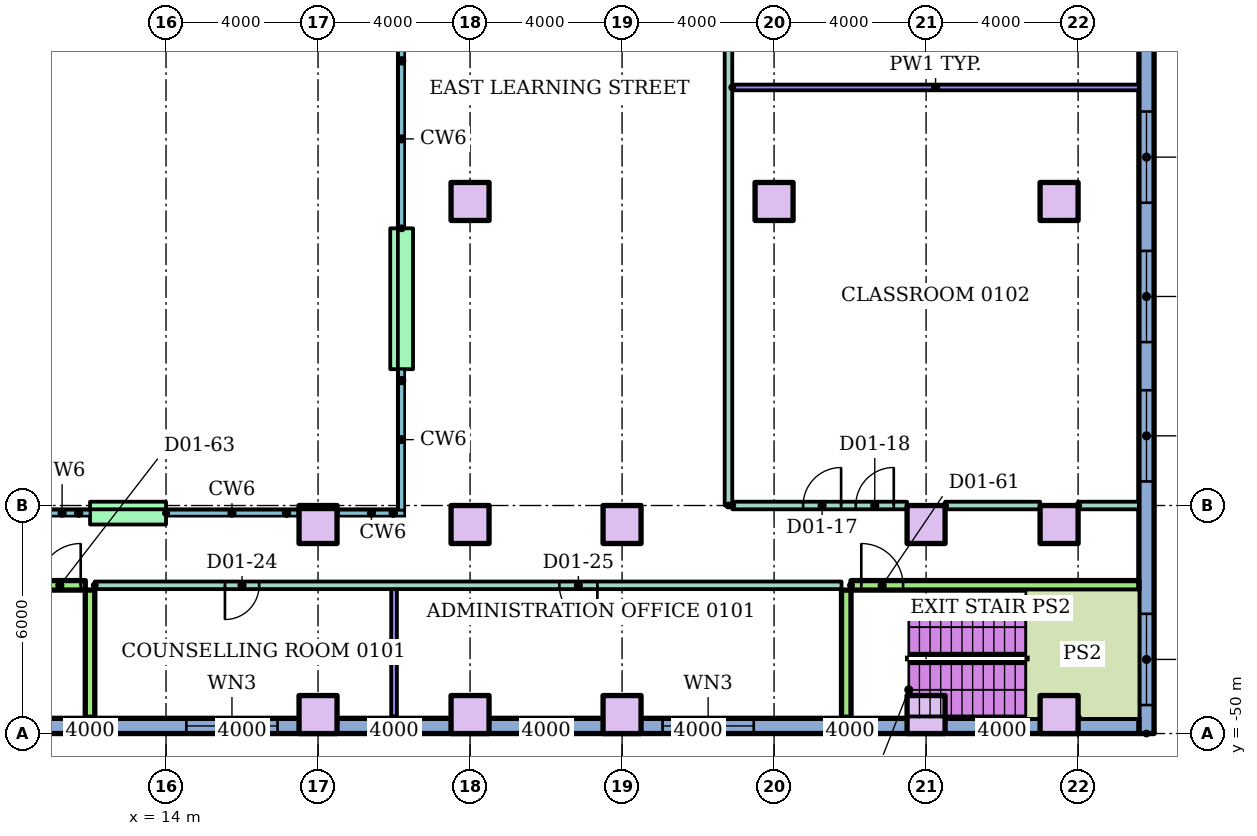
"""IFC4 building model, lengths in metres.
Left out: names, types, materials, properties, quantities, classifications, styles, units other than length and angle.
Written with IfcOpenShell. Run it as: python <this file> out.ifc"""

import sys

from ifc_helpers import new_model, si_unit, direction, frame, frame_2d, origin, origin_2d, place, context, subcontext, project, spatial, rectangle, extrude, element, fill, save


model = new_model("IFC4")
c1 = context("Model", 3, precision=1e-05, world=origin(), true_north=direction((0.0, 1.0)))
c2 = subcontext(c1, "Body", "Model", "MODEL_VIEW")
j1 = project(units=[si_unit("LENGTHUNIT", "METRE"), si_unit("PLANEANGLEUNIT", "RADIAN")], contexts=[c1])
p1 = place(None, origin())
s1 = spatial("IfcSite", under=j1, at=p1, CompositionType="ELEMENT")
p2 = place(p1, origin())
s2 = spatial("IfcBuilding", under=s1, at=p2, CompositionType="ELEMENT")
p3 = place(p2, frame((0.0, 0.0, 6.0)))
s3 = spatial("IfcBuildingStorey", under=s2, at=p3, CompositionType="ELEMENT", Elevation=6.0)
for number, where in (
    (1, (18.0, -49.5, 0.0)),
    (2, (22.0, -49.5, 0.0)),
    (3, (26.0, -49.5, 0.0)),
    (4, (34.0, -49.5, 0.0)),
    (5, (37.5, -49.5, 0.0)),
    (6, (18.0, -44.5, 0.0)),
    (7, (22.0, -44.5, 0.0)),
    (8, (26.0, -44.5, 0.0)),
    (9, (34.0, -44.5, 0.0)),
    (10, (37.5, -44.5, 0.0)),
    (11, (22.0, -36.0, 0.0)),
    (12, (30.0, -36.0, 0.0)),
    (13, (37.5, -36.0, 0.0)),
):
    element("IfcColumn", number, at=place(p3, frame(where)), inside=s3, PredefinedType="COLUMN", context=c2, shape_type="SweptSolid", body=[
        extrude(rectangle(XDim=1.0, YDim=1.0, at=origin_2d()), origin(), (0.0, 0.0, 1.0), 4.0),
    ])
p4 = place(p3, frame((39.8, -50.0, 0.0), z_axis=(0.0, 0.0, 1.0), x_axis=(0.0, 1.0, 0.0)))
e14 = element("IfcWall", 14, at=p4, inside=s3, PredefinedType="STANDARD", context=c2, shape_type="SweptSolid", body=[
    extrude(rectangle(XDim=70.0, YDim=0.4, at=frame_2d((35.0, 0.0))), origin(), (0.0, 0.0, 1.0), 3.7),
])
p5 = place(p4, frame((0.75, 0.0, 0.9)))
e15 = element("IfcOpeningElement", 15, at=p5, cuts=e14, PredefinedType="OPENING", context=c2, shape_type="SweptSolid", body=[
    extrude(rectangle(XDim=2.4, YDim=2.1, at=frame_2d((1.2, 1.05))), frame((0.0, 0.21, 0.0), z_axis=(0.0, -1.0, 0.0), x_axis=(1.0, 0.0, 0.0)), (0.0, 0.0, 1.0), 0.42),
])
p6 = place(p4, frame((6.633, 0.0, 0.9)))
e16 = element("IfcOpeningElement", 16, at=p6, cuts=e14, PredefinedType="OPENING", context=c2, shape_type="SweptSolid", body=[
    extrude(rectangle(XDim=2.4, YDim=2.1, at=frame_2d((1.2, 1.05))), frame((0.0, 0.21, 0.0), z_axis=(0.0, -1.0, 0.0), x_axis=(1.0, 0.0, 0.0)), (0.0, 0.0, 1.0), 0.42),
])
p7 = place(p4, frame((10.3, 0.0, 0.9)))
e17 = element("IfcOpeningElement", 17, at=p7, cuts=e14, PredefinedType="OPENING", context=c2, shape_type="SweptSolid", body=[
    extrude(rectangle(XDim=2.4, YDim=2.1, at=frame_2d((1.2, 1.05))), frame((0.0, 0.21, 0.0), z_axis=(0.0, -1.0, 0.0), x_axis=(1.0, 0.0, 0.0)), (0.0, 0.0, 1.0), 0.42),
])
p8 = place(p4, frame((13.967, 0.0, 0.9)))
e18 = element("IfcOpeningElement", 18, at=p8, cuts=e14, PredefinedType="OPENING", context=c2, shape_type="SweptSolid", body=[
    extrude(rectangle(XDim=2.4, YDim=2.1, at=frame_2d((1.2, 1.05))), frame((0.0, 0.21, 0.0), z_axis=(0.0, -1.0, 0.0), x_axis=(1.0, 0.0, 0.0)), (0.0, 0.0, 1.0), 0.42),
])
p9 = place(p4, frame((28.863, 0.0, 0.9)))
e19 = element("IfcOpeningElement", 19, at=p9, cuts=e14, PredefinedType="OPENING", context=c2, shape_type="SweptSolid", body=[
    extrude(rectangle(XDim=2.4, YDim=2.1, at=frame_2d((1.2, 1.05))), frame((0.0, 0.21, 0.0), z_axis=(0.0, -1.0, 0.0), x_axis=(1.0, 0.0, 0.0)), (0.0, 0.0, 1.0), 0.42),
])
p10 = place(p4, frame((32.988, 0.0, 0.9)))
e20 = element("IfcOpeningElement", 20, at=p10, cuts=e14, PredefinedType="OPENING", context=c2, shape_type="SweptSolid", body=[
    extrude(rectangle(XDim=2.4, YDim=2.1, at=frame_2d((1.2, 1.05))), frame((0.0, 0.21, 0.0), z_axis=(0.0, -1.0, 0.0), x_axis=(1.0, 0.0, 0.0)), (0.0, 0.0, 1.0), 0.42),
])
p11 = place(p4, frame((37.113, 0.0, 0.9)))
e21 = element("IfcOpeningElement", 21, at=p11, cuts=e14, PredefinedType="OPENING", context=c2, shape_type="SweptSolid", body=[
    extrude(rectangle(XDim=2.4, YDim=2.1, at=frame_2d((1.2, 1.05))), frame((0.0, 0.21, 0.0), z_axis=(0.0, -1.0, 0.0), x_axis=(1.0, 0.0, 0.0)), (0.0, 0.0, 1.0), 0.42),
])
p12 = place(p4, frame((41.238, 0.0, 0.9)))
e22 = element("IfcOpeningElement", 22, at=p12, cuts=e14, PredefinedType="OPENING", context=c2, shape_type="SweptSolid", body=[
    extrude(rectangle(XDim=2.4, YDim=2.1, at=frame_2d((1.2, 1.05))), frame((0.0, 0.21, 0.0), z_axis=(0.0, -1.0, 0.0), x_axis=(1.0, 0.0, 0.0)), (0.0, 0.0, 1.0), 0.42),
])
p13 = place(p4, frame((45.363, 0.0, 0.9)))
e23 = element("IfcOpeningElement", 23, at=p13, cuts=e14, PredefinedType="OPENING", context=c2, shape_type="SweptSolid", body=[
    extrude(rectangle(XDim=2.4, YDim=2.1, at=frame_2d((1.2, 1.05))), frame((0.0, 0.21, 0.0), z_axis=(0.0, -1.0, 0.0), x_axis=(1.0, 0.0, 0.0)), (0.0, 0.0, 1.0), 0.42),
])
p14 = place(p4, frame((49.488, 0.0, 0.9)))
e24 = element("IfcOpeningElement", 24, at=p14, cuts=e14, PredefinedType="OPENING", context=c2, shape_type="SweptSolid", body=[
    extrude(rectangle(XDim=2.4, YDim=2.1, at=frame_2d((1.2, 1.05))), frame((0.0, 0.21, 0.0), z_axis=(0.0, -1.0, 0.0), x_axis=(1.0, 0.0, 0.0)), (0.0, 0.0, 1.0), 0.42),
])
p15 = place(p4, frame((53.613, 0.0, 0.9)))
e25 = element("IfcOpeningElement", 25, at=p15, cuts=e14, PredefinedType="OPENING", context=c2, shape_type="SweptSolid", body=[
    extrude(rectangle(XDim=2.4, YDim=2.1, at=frame_2d((1.2, 1.05))), frame((0.0, 0.21, 0.0), z_axis=(0.0, -1.0, 0.0), x_axis=(1.0, 0.0, 0.0)), (0.0, 0.0, 1.0), 0.42),
])
p16 = place(p4, frame((57.738, 0.0, 0.9)))
e26 = element("IfcOpeningElement", 26, at=p16, cuts=e14, PredefinedType="OPENING", context=c2, shape_type="SweptSolid", body=[
    extrude(rectangle(XDim=2.4, YDim=2.1, at=frame_2d((1.2, 1.05))), frame((0.0, 0.21, 0.0), z_axis=(0.0, -1.0, 0.0), x_axis=(1.0, 0.0, 0.0)), (0.0, 0.0, 1.0), 0.42),
])
p17 = place(p4, frame((62.05, 0.0, 0.9)))
e27 = element("IfcOpeningElement", 27, at=p17, cuts=e14, PredefinedType="OPENING", context=c2, shape_type="SweptSolid", body=[
    extrude(rectangle(XDim=2.4, YDim=2.1, at=frame_2d((1.2, 1.05))), frame((0.0, 0.21, 0.0), z_axis=(0.0, -1.0, 0.0), x_axis=(1.0, 0.0, 0.0)), (0.0, 0.0, 1.0), 0.42),
])
p18 = place(p4, frame((66.55, 0.0, 0.9)))
e28 = element("IfcOpeningElement", 28, at=p18, cuts=e14, PredefinedType="OPENING", context=c2, shape_type="SweptSolid", body=[
    extrude(rectangle(XDim=2.4, YDim=2.1, at=frame_2d((1.2, 1.05))), frame((0.0, 0.21, 0.0), z_axis=(0.0, -1.0, 0.0), x_axis=(1.0, 0.0, 0.0)), (0.0, 0.0, 1.0), 0.42),
])
p19 = place(p3, frame((-39.6, -49.8, 0.0)))
e29 = element("IfcWall", 29, at=p19, inside=s3, PredefinedType="STANDARD", context=c2, shape_type="SweptSolid", body=[
    extrude(rectangle(XDim=79.2, YDim=0.4, at=frame_2d((39.6, 0.0))), origin(), (0.0, 0.0, 1.0), 3.7),
])
p20 = place(p19, frame((10.665, 0.0, 0.9)))
e30 = element("IfcOpeningElement", 30, at=p20, cuts=e29, PredefinedType="OPENING", context=c2, shape_type="SweptSolid", body=[
    extrude(rectangle(XDim=2.4, YDim=2.1, at=frame_2d((1.2, 1.05))), frame((0.0, 0.21, 0.0), z_axis=(0.0, -1.0, 0.0), x_axis=(1.0, 0.0, 0.0)), (0.0, 0.0, 1.0), 0.42),
])
p21 = place(p19, frame((18.665, 0.0, 0.9)))
e31 = element("IfcOpeningElement", 31, at=p21, cuts=e29, PredefinedType="OPENING", context=c2, shape_type="SweptSolid", body=[
    extrude(rectangle(XDim=2.4, YDim=2.1, at=frame_2d((1.2, 1.05))), frame((0.0, 0.21, 0.0), z_axis=(0.0, -1.0, 0.0), x_axis=(1.0, 0.0, 0.0)), (0.0, 0.0, 1.0), 0.42),
])
p22 = place(p19, frame((22.135, 0.0, 0.9)))
e32 = element("IfcOpeningElement", 32, at=p22, cuts=e29, PredefinedType="OPENING", context=c2, shape_type="SweptSolid", body=[
    extrude(rectangle(XDim=2.4, YDim=2.1, at=frame_2d((1.2, 1.05))), frame((0.0, 0.21, 0.0), z_axis=(0.0, -1.0, 0.0), x_axis=(1.0, 0.0, 0.0)), (0.0, 0.0, 1.0), 0.42),
])
p23 = place(p19, frame((30.135, 0.0, 0.9)))
e33 = element("IfcOpeningElement", 33, at=p23, cuts=e29, PredefinedType="OPENING", context=c2, shape_type="SweptSolid", body=[
    extrude(rectangle(XDim=2.05, YDim=2.1, at=frame_2d((1.025, 1.05))), frame((0.0, 0.21, 0.0), z_axis=(0.0, -1.0, 0.0), x_axis=(1.0, 0.0, 0.0)), (0.0, 0.0, 1.0), 0.42),
])
p24 = place(p19, frame((38.135, 0.0, 0.9)))
e34 = element("IfcOpeningElement", 34, at=p24, cuts=e29, PredefinedType="OPENING", context=c2, shape_type="SweptSolid", body=[
    extrude(rectangle(XDim=2.4, YDim=2.1, at=frame_2d((1.2, 1.05))), frame((0.0, 0.21, 0.0), z_axis=(0.0, -1.0, 0.0), x_axis=(1.0, 0.0, 0.0)), (0.0, 0.0, 1.0), 0.42),
])
p25 = place(p19, frame((47.015, 0.0, 0.9)))
e35 = element("IfcOpeningElement", 35, at=p25, cuts=e29, PredefinedType="OPENING", context=c2, shape_type="SweptSolid", body=[
    extrude(rectangle(XDim=1.52, YDim=2.1, at=frame_2d((0.76, 1.05))), frame((0.0, 0.21, 0.0), z_axis=(0.0, -1.0, 0.0), x_axis=(1.0, 0.0, 0.0)), (0.0, 0.0, 1.0), 0.42),
])
p26 = place(p19, frame((54.135, 0.0, 0.9)))
e36 = element("IfcOpeningElement", 36, at=p26, cuts=e29, PredefinedType="OPENING", context=c2, shape_type="SweptSolid", body=[
    extrude(rectangle(XDim=2.4, YDim=2.1, at=frame_2d((1.2, 1.05))), frame((0.0, 0.21, 0.0), z_axis=(0.0, -1.0, 0.0), x_axis=(1.0, 0.0, 0.0)), (0.0, 0.0, 1.0), 0.42),
])
p27 = place(p19, frame((66.665, 0.0, 0.9)))
e37 = element("IfcOpeningElement", 37, at=p27, cuts=e29, PredefinedType="OPENING", context=c2, shape_type="SweptSolid", body=[
    extrude(rectangle(XDim=2.4, YDim=2.1, at=frame_2d((1.2, 1.05))), frame((0.0, 0.21, 0.0), z_axis=(0.0, -1.0, 0.0), x_axis=(1.0, 0.0, 0.0)), (0.0, 0.0, 1.0), 0.42),
])
p28 = place(p3, frame((14.0, -44.2, 0.0), z_axis=(0.0, 0.0, 1.0), x_axis=(-1.0, 0.0, 0.0)))
e38 = element("IfcWall", 38, at=p28, inside=s3, PredefinedType="STANDARD", context=c2, shape_type="SweptSolid", body=[
    extrude(rectangle(XDim=2.0, YDim=0.6, at=frame_2d((1.0, 0.0))), origin(), (0.0, 0.0, 1.0), 3.7),
])
p29 = place(p3, frame((20.2, -36.707, 0.0), z_axis=(0.0, 0.0, 1.0), x_axis=(0.0, -1.0, 0.0)))
e39 = element("IfcWall", 39, at=p29, inside=s3, PredefinedType="STANDARD", context=c2, shape_type="SweptSolid", body=[
    extrude(rectangle(XDim=3.707, YDim=0.6, at=frame_2d((1.853, 0.0))), origin(), (0.0, 0.0, 1.0), 3.7),
])
p30 = place(p3, frame((12.125, -46.1, 0.0)))
e40 = element("IfcWall", 40, at=p30, inside=s3, PredefinedType="PARTITIONING", context=c2, shape_type="SweptSolid", body=[
    extrude(rectangle(XDim=19.65, YDim=0.2, at=frame_2d((9.825, 0.0))), origin(), (0.0, 0.0, 1.0), 3.7),
])
p31 = place(p30, frame((3.425, 0.0, 0.0)))
e41 = element("IfcOpeningElement", 41, at=p31, cuts=e40, PredefinedType="OPENING", context=c2, shape_type="SweptSolid", body=[
    extrude(rectangle(XDim=0.9, YDim=2.1, at=frame_2d((0.45, 1.05))), frame((0.0, 0.11, 0.0), z_axis=(0.0, -1.0, 0.0), x_axis=(1.0, 0.0, 0.0)), (0.0, 0.0, 1.0), 0.22),
])
p32 = place(p30, frame((12.225, 0.0, 0.0)))
e42 = element("IfcOpeningElement", 42, at=p32, cuts=e40, PredefinedType="OPENING", context=c2, shape_type="SweptSolid", body=[
    extrude(rectangle(XDim=1.0, YDim=2.1, at=frame_2d((0.5, 1.05))), frame((0.0, 0.11, 0.0), z_axis=(0.0, -1.0, 0.0), x_axis=(1.0, 0.0, 0.0)), (0.0, 0.0, 1.0), 0.22),
])
p33 = place(p3, frame((4.125, -46.1, 0.0)))
e43 = element("IfcWall", 43, at=p33, inside=s3, PredefinedType="SOLIDWALL", context=c2, shape_type="SweptSolid", body=[
    extrude(rectangle(XDim=7.75, YDim=0.25, at=frame_2d((3.875, 0.0))), origin(), (0.0, 0.0, 1.0), 3.7),
])
p34 = place(p33, frame((6.53, 0.0, 0.0)))
e44 = element("IfcOpeningElement", 44, at=p34, cuts=e43, PredefinedType="OPENING", context=c2, shape_type="SweptSolid", body=[
    extrude(rectangle(XDim=1.1, YDim=2.1, at=frame_2d((0.55, 1.05))), frame((0.0, 0.135, 0.0), z_axis=(0.0, -1.0, 0.0), x_axis=(1.0, 0.0, 0.0)), (0.0, 0.0, 1.0), 0.27),
])
p35 = place(p3, frame((32.025, -46.1, 0.0)))
e45 = element("IfcWall", 45, at=p35, inside=s3, PredefinedType="SOLIDWALL", context=c2, shape_type="SweptSolid", body=[
    extrude(rectangle(XDim=7.575, YDim=0.25, at=frame_2d((3.788, 0.0))), origin(), (0.0, 0.0, 1.0), 3.7),
])
p36 = place(p35, frame((0.27, 0.0, 0.0)))
e46 = element("IfcOpeningElement", 46, at=p36, cuts=e45, PredefinedType="OPENING", context=c2, shape_type="SweptSolid", body=[
    extrude(rectangle(XDim=1.1, YDim=2.1, at=frame_2d((0.55, 1.05))), frame((0.0, 0.135, 0.0), z_axis=(0.0, -1.0, 0.0), x_axis=(1.0, 0.0, 0.0)), (0.0, 0.0, 1.0), 0.27),
])
p37 = place(p3, frame((28.9, -44.0, 0.0)))
e47 = element("IfcWall", 47, at=p37, inside=s3, PredefinedType="PARTITIONING", context=c2, shape_type="SweptSolid", body=[
    extrude(rectangle(XDim=4.6, YDim=0.2, at=frame_2d((2.3, 0.0))), origin(), (0.0, 0.0, 1.0), 3.7),
])
p38 = place(p37, frame((1.864, 0.0, 0.0)))
e48 = element("IfcOpeningElement", 48, at=p38, cuts=e47, PredefinedType="OPENING", context=c2, shape_type="SweptSolid", body=[
    extrude(rectangle(XDim=1.0, YDim=2.1, at=frame_2d((0.5, 1.05))), frame((0.0, 0.11, 0.0), z_axis=(0.0, -1.0, 0.0), x_axis=(1.0, 0.0, 0.0)), (0.0, 0.0, 1.0), 0.22),
])
p39 = place(p37, frame((3.25, 0.0, 0.0)))
e49 = element("IfcOpeningElement", 49, at=p39, cuts=e47, PredefinedType="OPENING", context=c2, shape_type="SweptSolid", body=[
    extrude(rectangle(XDim=1.0, YDim=2.1, at=frame_2d((0.5, 1.05))), frame((0.0, 0.11, 0.0), z_axis=(0.0, -1.0, 0.0), x_axis=(1.0, 0.0, 0.0)), (0.0, 0.0, 1.0), 0.22),
])
p40 = place(p3, frame((34.5, -44.0, 0.0)))
e50 = element("IfcWall", 50, at=p40, inside=s3, PredefinedType="PARTITIONING", context=c2, shape_type="SweptSolid", body=[
    extrude(rectangle(XDim=2.5, YDim=0.2, at=frame_2d((1.25, 0.0))), origin(), (0.0, 0.0, 1.0), 3.7),
])
p41 = place(p3, frame((38.0, -44.0, 0.0)))
e51 = element("IfcWall", 51, at=p41, inside=s3, PredefinedType="PARTITIONING", context=c2, shape_type="SweptSolid", body=[
    extrude(rectangle(XDim=1.6, YDim=0.2, at=frame_2d((0.8, 0.0))), origin(), (0.0, 0.0, 1.0), 3.7),
])
p42 = place(p3, frame((28.9, -33.0, 0.0)))
e52 = element("IfcWall", 52, at=p42, inside=s3, PredefinedType="PARTITIONING", context=c2, shape_type="SweptSolid", body=[
    extrude(rectangle(XDim=10.7, YDim=0.15, at=frame_2d((5.35, 0.0))), origin(), (0.0, 0.0, 1.0), 3.7),
])
p43 = place(p3, frame((12.0, -49.6, 0.0), z_axis=(0.0, 0.0, 1.0), x_axis=(0.0, 1.0, 0.0)))
e53 = element("IfcWall", 53, at=p43, inside=s3, PredefinedType="SOLIDWALL", context=c2, shape_type="SweptSolid", body=[
    extrude(rectangle(XDim=3.375, YDim=0.25, at=frame_2d((1.688, 0.0))), origin(), (0.0, 0.0, 1.0), 3.7),
])
p44 = place(p3, frame((20.0, -49.6, 0.0), z_axis=(0.0, 0.0, 1.0), x_axis=(0.0, 1.0, 0.0)))
e54 = element("IfcWall", 54, at=p44, inside=s3, PredefinedType="PARTITIONING", context=c2, shape_type="SweptSolid", body=[
    extrude(rectangle(XDim=3.4, YDim=0.15, at=frame_2d((1.7, 0.0))), origin(), (0.0, 0.0, 1.0), 3.7),
])
p45 = place(p3, frame((28.8, -44.0, 0.0), z_axis=(0.0, 0.0, 1.0), x_axis=(0.0, 1.0, 0.0)))
e55 = element("IfcWall", 55, at=p45, inside=s3, PredefinedType="PARTITIONING", context=c2, shape_type="SweptSolid", body=[
    extrude(rectangle(XDim=21.9, YDim=0.2, at=frame_2d((10.95, 0.0))), origin(), (0.0, 0.0, 1.0), 3.7),
])
p46 = place(p3, frame((31.9, -49.6, 0.0), z_axis=(0.0, 0.0, 1.0), x_axis=(0.0, 1.0, 0.0)))
e56 = element("IfcWall", 56, at=p46, inside=s3, PredefinedType="SOLIDWALL", context=c2, shape_type="SweptSolid", body=[
    extrude(rectangle(XDim=3.375, YDim=0.25, at=frame_2d((1.688, 0.0))), origin(), (0.0, 0.0, 1.0), 3.7),
])
p47 = place(p5, origin())
e57 = element("IfcWindow", 57, at=p47, inside=s3, PartitioningType="SINGLE_PANEL", PredefinedType="WINDOW", context=c2, shape_type="SweptSolid", body=[
    extrude(rectangle(XDim=2.4, YDim=2.1, at=frame_2d((1.2, 1.05))), frame((0.0, 0.03, 0.0), z_axis=(0.0, -1.0, 0.0), x_axis=(1.0, 0.0, 0.0)), (0.0, 0.0, 1.0), 0.06),
])
fill(e15, e57)
p48 = place(p6, origin())
e58 = element("IfcWindow", 58, at=p48, inside=s3, PartitioningType="SINGLE_PANEL", PredefinedType="WINDOW", context=c2, shape_type="SweptSolid", body=[
    extrude(rectangle(XDim=2.4, YDim=2.1, at=frame_2d((1.2, 1.05))), frame((0.0, 0.03, 0.0), z_axis=(0.0, -1.0, 0.0), x_axis=(1.0, 0.0, 0.0)), (0.0, 0.0, 1.0), 0.06),
])
fill(e16, e58)
p49 = place(p7, origin())
e59 = element("IfcWindow", 59, at=p49, inside=s3, PartitioningType="SINGLE_PANEL", PredefinedType="WINDOW", context=c2, shape_type="SweptSolid", body=[
    extrude(rectangle(XDim=2.4, YDim=2.1, at=frame_2d((1.2, 1.05))), frame((0.0, 0.03, 0.0), z_axis=(0.0, -1.0, 0.0), x_axis=(1.0, 0.0, 0.0)), (0.0, 0.0, 1.0), 0.06),
])
fill(e17, e59)
p50 = place(p8, origin())
e60 = element("IfcWindow", 60, at=p50, inside=s3, PartitioningType="SINGLE_PANEL", PredefinedType="WINDOW", context=c2, shape_type="SweptSolid", body=[
    extrude(rectangle(XDim=2.4, YDim=2.1, at=frame_2d((1.2, 1.05))), frame((0.0, 0.03, 0.0), z_axis=(0.0, -1.0, 0.0), x_axis=(1.0, 0.0, 0.0)), (0.0, 0.0, 1.0), 0.06),
])
fill(e18, e60)
p51 = place(p26, origin())
e61 = element("IfcWindow", 61, at=p51, inside=s3, PartitioningType="SINGLE_PANEL", PredefinedType="WINDOW", context=c2, shape_type="SweptSolid", body=[
    extrude(rectangle(XDim=2.4, YDim=2.1, at=frame_2d((1.2, 1.05))), frame((0.0, 0.03, 0.0), z_axis=(0.0, -1.0, 0.0), x_axis=(1.0, 0.0, 0.0)), (0.0, 0.0, 1.0), 0.06),
])
fill(e36, e61)
p52 = place(p27, origin())
e62 = element("IfcWindow", 62, at=p52, inside=s3, PartitioningType="SINGLE_PANEL", PredefinedType="WINDOW", context=c2, shape_type="SweptSolid", body=[
    extrude(rectangle(XDim=2.4, YDim=2.1, at=frame_2d((1.2, 1.05))), frame((0.0, 0.03, 0.0), z_axis=(0.0, -1.0, 0.0), x_axis=(1.0, 0.0, 0.0)), (0.0, 0.0, 1.0), 0.06),
])
fill(e37, e62)
p53 = place(p38, origin())
e63 = element("IfcDoor", 63, at=p53, inside=s3, OperationType="SINGLE_SWING_RIGHT", PredefinedType="DOOR", context=c2, shape_type="SweptSolid", body=[
    extrude(rectangle(XDim=1.0, YDim=2.1, at=frame_2d((0.5, 1.05))), frame((0.0, 0.025, 0.0), z_axis=(0.0, -1.0, 0.0), x_axis=(1.0, 0.0, 0.0)), (0.0, 0.0, 1.0), 0.05),
])
fill(e48, e63)
p54 = place(p39, origin())
e64 = element("IfcDoor", 64, at=p54, inside=s3, OperationType="SINGLE_SWING_RIGHT", PredefinedType="DOOR", context=c2, shape_type="SweptSolid", body=[
    extrude(rectangle(XDim=1.0, YDim=2.1, at=frame_2d((0.5, 1.05))), frame((0.0, 0.025, 0.0), z_axis=(0.0, -1.0, 0.0), x_axis=(1.0, 0.0, 0.0)), (0.0, 0.0, 1.0), 0.05),
])
fill(e49, e64)
p55 = place(p31, frame((0.9, 0.0, 0.0), z_axis=(0.0, 0.0, 1.0), x_axis=(-1.0, 0.0, 0.0)))
e65 = element("IfcDoor", 65, at=p55, inside=s3, OperationType="SINGLE_SWING_LEFT", PredefinedType="DOOR", context=c2, shape_type="SweptSolid", body=[
    extrude(rectangle(XDim=0.9, YDim=2.1, at=frame_2d((0.45, 1.05))), frame((0.0, 0.025, 0.0), z_axis=(0.0, -1.0, 0.0), x_axis=(1.0, 0.0, 0.0)), (0.0, 0.0, 1.0), 0.05),
])
fill(e41, e65)
p56 = place(p32, frame((1.0, 0.0, 0.0), z_axis=(0.0, 0.0, 1.0), x_axis=(-1.0, 0.0, 0.0)))
e66 = element("IfcDoor", 66, at=p56, inside=s3, OperationType="SINGLE_SWING_RIGHT", PredefinedType="DOOR", context=c2, shape_type="SweptSolid", body=[
    extrude(rectangle(XDim=1.0, YDim=2.1, at=frame_2d((0.5, 1.05))), frame((0.0, 0.025, 0.0), z_axis=(0.0, -1.0, 0.0), x_axis=(1.0, 0.0, 0.0)), (0.0, 0.0, 1.0), 0.05),
])
fill(e42, e66)
p57 = place(p36, origin())
e67 = element("IfcDoor", 67, at=p57, inside=s3, OperationType="SINGLE_SWING_LEFT", PredefinedType="DOOR", context=c2, shape_type="SweptSolid", body=[
    extrude(rectangle(XDim=1.1, YDim=2.1, at=frame_2d((0.55, 1.05))), frame((0.0, 0.025, 0.0), z_axis=(0.0, -1.0, 0.0), x_axis=(1.0, 0.0, 0.0)), (0.0, 0.0, 1.0), 0.05),
])
fill(e46, e67)
p58 = place(p34, origin())
e68 = element("IfcDoor", 68, at=p58, inside=s3, OperationType="SINGLE_SWING_RIGHT", PredefinedType="DOOR", context=c2, shape_type="SweptSolid", body=[
    extrude(rectangle(XDim=1.1, YDim=2.1, at=frame_2d((0.55, 1.05))), frame((0.0, 0.025, 0.0), z_axis=(0.0, -1.0, 0.0), x_axis=(1.0, 0.0, 0.0)), (0.0, 0.0, 1.0), 0.05),
])
fill(e44, e68)
save(model, sys.argv[1])
